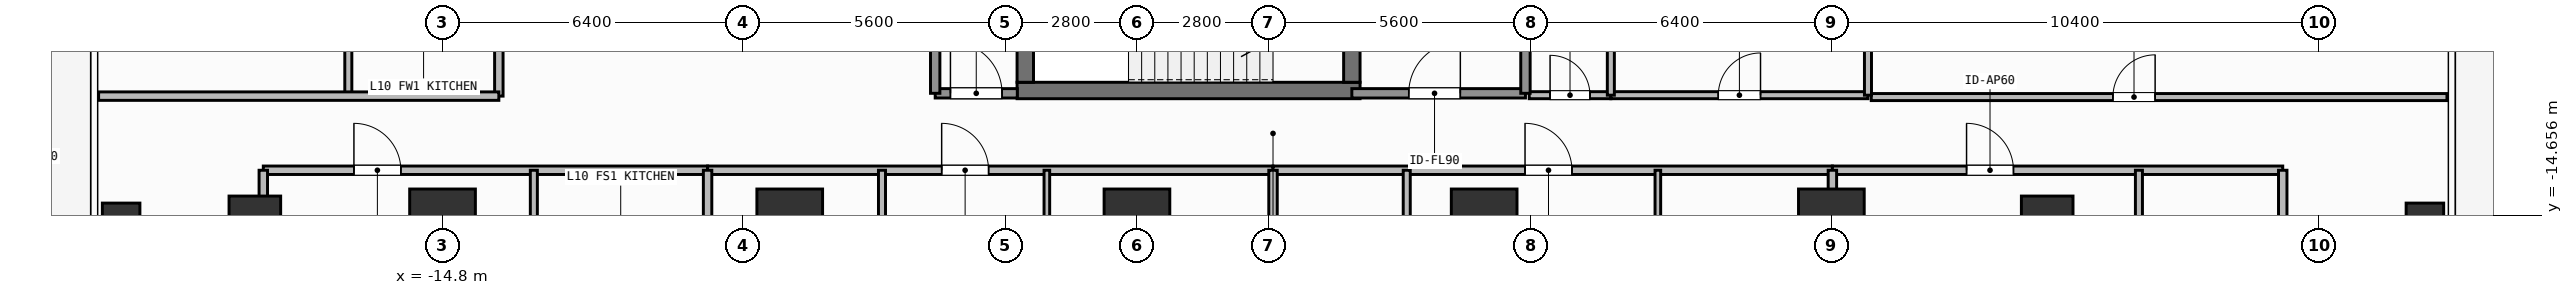
"""IFC4 building model, lengths in metres.
Left out: names, types, materials, properties, quantities, classifications, styles, units other than length and angle.
Written with IfcOpenShell. Run it as: python <this file> out.ifc"""

import sys

from ifc_helpers import new_model, si_unit, direction, frame, frame_2d, origin, origin_2d, place, context, subcontext, project, spatial, rectangle, hollow_rectangle, extrude, element, fill, save


model = new_model("IFC4")
c1 = context("Model", 3, precision=1e-05, world=origin(), true_north=direction((0.0, 1.0)))
c2 = subcontext(c1, "Body", "Model", "MODEL_VIEW")
j1 = project(units=[si_unit("LENGTHUNIT", "METRE"), si_unit("PLANEANGLEUNIT", "RADIAN")], contexts=[c1])
p1 = place(None, origin())
s1 = spatial("IfcSite", under=j1, at=p1, CompositionType="ELEMENT")
p2 = place(p1, origin())
s2 = spatial("IfcBuilding", under=s1, at=p2, CompositionType="ELEMENT")
p3 = place(p2, frame((0.0, 0.0, 38.4)))
s3 = spatial("IfcBuildingStorey", under=s2, at=p3, CompositionType="ELEMENT", Elevation=38.4)
p4 = place(p3, frame((-2.555, -12.0, 0.0), z_axis=(0.0, 0.0, 1.0), x_axis=(1.0, 0.0, 0.0)))
e1 = element("IfcWall", 1, at=p4, inside=s3, PredefinedType="SHEAR", context=c2, shape_type="SweptSolid", body=[
    extrude(rectangle(XDim=7.31, YDim=0.35, at=frame_2d((3.655, 0.0))), origin(), (0.0, 0.0, 1.0), 3.9),
])
p5 = place(p3, frame((-2.38, -11.825, 0.0), z_axis=(0.0, 0.0, 1.0), x_axis=(0.0, 1.0, 0.0)))
e2 = element("IfcWall", 2, at=p5, inside=s3, PredefinedType="SHEAR", context=c2, shape_type="SweptSolid", body=[
    extrude(rectangle(XDim=2.925, YDim=0.35, at=frame_2d((1.462, 0.0))), origin(), (0.0, 0.0, 1.0), 3.9),
])
p6 = place(p3, frame((4.58, -8.9, 0.0), z_axis=(0.0, 0.0, 1.0), x_axis=(0.0, -1.0, 0.0)))
e3 = element("IfcWall", 3, at=p6, inside=s3, PredefinedType="SHEAR", context=c2, shape_type="SweptSolid", body=[
    extrude(rectangle(XDim=2.925, YDim=0.35, at=frame_2d((1.462, 0.0))), origin(), (0.0, 0.0, 1.0), 3.9),
])
p7 = place(p6, frame((0.913, 0.0, 0.0)))
e4 = element("IfcOpeningElement", 4, at=p7, cuts=e3, PredefinedType="OPENING", context=c2, shape_type="SweptSolid", body=[
    extrude(rectangle(XDim=1.1, YDim=2.15, at=frame_2d((0.55, 1.075))), frame((0.0, 0.185, 0.0), z_axis=(0.0, -1.0, 0.0), x_axis=(1.0, 0.0, 0.0)), (0.0, 0.0, 1.0), 0.37),
])
for number, where, z_axis, x_axis in (
    (5, (-14.8, -14.8, 0.0), (0.0, 0.0, 1.0), (1.0, 0.0, 0.0)),
    (6, (-7.4, -14.8, 0.0), (0.0, 0.0, 1.0), (1.0, 0.0, 0.0)),
    (7, (0.0, -14.8, 0.0), (0.0, 0.0, 1.0), (1.0, 0.0, 0.0)),
    (8, (7.4, -14.8, 0.0), (0.0, 0.0, 1.0), (1.0, 0.0, 0.0)),
    (9, (14.8, -14.8, 0.0), (0.0, 0.0, 1.0), (1.0, 0.0, 0.0)),
):
    element("IfcColumn", number, at=place(p3, frame(where, z_axis=z_axis, x_axis=x_axis)), inside=s3, PredefinedType="COLUMN", context=c2, shape_type="SweptSolid", body=[
        extrude(rectangle(XDim=1.4, YDim=1.4, at=origin_2d()), origin(), (0.0, 0.0, 1.0), 3.9),
    ])
for number, where, z_axis, x_axis in (
    (10, (-18.8, -14.8, 0.0), (0.0, 0.0, 1.0), (1.0, 0.0, 0.0)),
    (11, (19.4, -14.8, 0.0), (0.0, 0.0, 1.0), (1.0, 0.0, 0.0)),
):
    element("IfcColumn", number, at=place(p3, frame(where, z_axis=z_axis, x_axis=x_axis)), inside=s3, PredefinedType="COLUMN", context=c2, shape_type="SweptSolid", body=[
        extrude(rectangle(XDim=1.1, YDim=1.1, at=origin_2d()), origin(), (0.0, 0.0, 1.0), 3.9),
    ])
for number, where, z_axis, x_axis in (
    (12, (-21.65, -14.8, 0.0), (0.0, 0.0, 1.0), (1.0, 0.0, 0.0)),
    (13, (27.45, -14.8, 0.0), (0.0, 0.0, 1.0), (1.0, 0.0, 0.0)),
):
    element("IfcColumn", number, at=place(p3, frame(where, z_axis=z_axis, x_axis=x_axis)), inside=s3, PredefinedType="COLUMN", context=c2, shape_type="SweptSolid", body=[
        extrude(hollow_rectangle(XDim=0.8, YDim=0.8, WallThickness=0.036, at=origin_2d()), origin(), (0.0, 0.0, 1.0), 3.9),
    ])
p8 = place(p3, frame((4.58, -12.06, 0.0), z_axis=(0.0, 0.0, 1.0), x_axis=(1.0, 0.0, 0.0)))
e14 = element("IfcWall", 14, at=p8, inside=s3, PredefinedType="SOLIDWALL", context=c2, shape_type="SweptSolid", body=[
    extrude(rectangle(XDim=3.7, YDim=0.2, at=frame_2d((1.85, 0.0))), origin(), (0.0, 0.0, 1.0), 3.68),
])
p9 = place(p8, frame((1.212, 0.0, 0.0)))
e15 = element("IfcOpeningElement", 15, at=p9, cuts=e14, PredefinedType="OPENING", context=c2, shape_type="SweptSolid", body=[
    extrude(rectangle(XDim=1.1, YDim=2.15, at=frame_2d((0.55, 1.075))), frame((0.0, 0.11, 0.0), z_axis=(0.0, -1.0, 0.0), x_axis=(1.0, 0.0, 0.0)), (0.0, 0.0, 1.0), 0.22),
])
p10 = place(p3, frame((-4.3, -12.06, 0.0), z_axis=(0.0, 0.0, 1.0), x_axis=(1.0, 0.0, 0.0)))
e16 = element("IfcWall", 16, at=p10, inside=s3, PredefinedType="SOLIDWALL", context=c2, shape_type="SweptSolid", body=[
    extrude(rectangle(XDim=1.75, YDim=0.2, at=frame_2d((0.875, 0.0))), origin(), (0.0, 0.0, 1.0), 3.68),
])
p11 = place(p10, frame((0.325, 0.0, 0.0)))
e17 = element("IfcOpeningElement", 17, at=p11, cuts=e16, PredefinedType="OPENING", context=c2, shape_type="SweptSolid", body=[
    extrude(rectangle(XDim=1.1, YDim=2.15, at=frame_2d((0.55, 1.075))), frame((0.0, 0.11, 0.0), z_axis=(0.0, -1.0, 0.0), x_axis=(1.0, 0.0, 0.0)), (0.0, 0.0, 1.0), 0.22),
])
p12 = place(p3, frame((8.36, -12.1, 0.0), z_axis=(0.0, 0.0, 1.0), x_axis=(1.0, 0.0, 0.0)))
e18 = element("IfcWall", 18, at=p12, inside=s3, PredefinedType="PARTITIONING", context=c2, shape_type="SweptSolid", body=[
    extrude(rectangle(XDim=1.74, YDim=0.15, at=frame_2d((0.87, 0.0))), origin(), (0.0, 0.0, 1.0), 3.68),
])
p13 = place(p12, frame((0.445, 0.0, 0.0)))
e19 = element("IfcOpeningElement", 19, at=p13, cuts=e18, PredefinedType="OPENING", context=c2, shape_type="SweptSolid", body=[
    extrude(rectangle(XDim=0.85, YDim=2.1, at=frame_2d((0.425, 1.05))), frame((0.0, 0.085, 0.0), z_axis=(0.0, -1.0, 0.0), x_axis=(1.0, 0.0, 0.0)), (0.0, 0.0, 1.0), 0.17),
])
p14 = place(p3, frame((10.1, -12.1, 0.0), z_axis=(0.0, 0.0, 1.0), x_axis=(1.0, 0.0, 0.0)))
e20 = element("IfcWall", 20, at=p14, inside=s3, PredefinedType="PARTITIONING", context=c2, shape_type="SweptSolid", body=[
    extrude(rectangle(XDim=5.48, YDim=0.15, at=frame_2d((2.74, 0.0))), origin(), (0.0, 0.0, 1.0), 3.68),
])
p15 = place(p14, frame((2.29, 0.0, 0.0)))
e21 = element("IfcOpeningElement", 21, at=p15, cuts=e20, PredefinedType="OPENING", context=c2, shape_type="SweptSolid", body=[
    extrude(rectangle(XDim=0.9, YDim=2.1, at=frame_2d((0.45, 1.05))), frame((0.0, 0.085, 0.0), z_axis=(0.0, -1.0, 0.0), x_axis=(1.0, 0.0, 0.0)), (0.0, 0.0, 1.0), 0.17),
])
p16 = place(p3, frame((-18.62, -13.7, 0.0), z_axis=(0.0, 0.0, 1.0), x_axis=(1.0, 0.0, 0.0)))
e22 = element("IfcWall", 22, at=p16, inside=s3, PredefinedType="PARTITIONING", context=c2, shape_type="SweptSolid", body=[
    extrude(rectangle(XDim=9.469, YDim=0.18, at=frame_2d((4.735, 0.0))), origin(), (0.0, 0.0, 1.0), 3.68),
])
p17 = place(p16, frame((1.931, 0.0, 0.0)))
e23 = element("IfcOpeningElement", 23, at=p17, cuts=e22, PredefinedType="OPENING", context=c2, shape_type="SweptSolid", body=[
    extrude(rectangle(XDim=1.0, YDim=2.2, at=frame_2d((0.5, 1.1))), frame((0.0, 0.1, 0.0), z_axis=(0.0, -1.0, 0.0), x_axis=(1.0, 0.0, 0.0)), (0.0, 0.0, 1.0), 0.2),
])
p18 = place(p3, frame((-12.854, -17.599, 0.0), z_axis=(0.0, 0.0, 1.0), x_axis=(0.0, 1.0, 0.0)))
e24 = element("IfcWall", 24, at=p18, inside=s3, PredefinedType="PARTITIONING", context=c2, shape_type="SweptSolid", body=[
    extrude(rectangle(XDim=3.899, YDim=0.15, at=frame_2d((1.95, 0.0))), origin(), (0.0, 0.0, 1.0), 3.68),
])
p19 = place(p18, frame((1.183, 0.0, 0.0)))
e25 = element("IfcOpeningElement", 25, at=p19, cuts=e24, PredefinedType="OPENING", context=c2, shape_type="SweptSolid", body=[
    extrude(rectangle(XDim=0.85, YDim=2.1, at=frame_2d((0.425, 1.05))), frame((0.0, 0.085, 0.0), z_axis=(0.0, -1.0, 0.0), x_axis=(1.0, 0.0, 0.0)), (0.0, 0.0, 1.0), 0.17),
])
p20 = place(p3, frame((-9.151, -13.7, 0.0), z_axis=(0.0, 0.0, 1.0), x_axis=(1.0, 0.0, 0.0)))
e26 = element("IfcWall", 26, at=p20, inside=s3, PredefinedType="PARTITIONING", context=c2, shape_type="SweptSolid", body=[
    extrude(rectangle(XDim=12.051, YDim=0.18, at=frame_2d((6.025, 0.0))), origin(), (0.0, 0.0, 1.0), 3.68),
])
p21 = place(p20, frame((4.989, 0.0, 0.0)))
e27 = element("IfcOpeningElement", 27, at=p21, cuts=e26, PredefinedType="OPENING", context=c2, shape_type="SweptSolid", body=[
    extrude(rectangle(XDim=1.0, YDim=2.2, at=frame_2d((0.5, 1.1))), frame((0.0, 0.1, 0.0), z_axis=(0.0, -1.0, 0.0), x_axis=(1.0, 0.0, 0.0)), (0.0, 0.0, 1.0), 0.2),
])
p22 = place(p3, frame((-5.434, -20.79, 0.0), z_axis=(0.0, 0.0, 1.0), x_axis=(0.0, 1.0, 0.0)))
e28 = element("IfcWall", 28, at=p22, inside=s3, PredefinedType="PARTITIONING", context=c2, shape_type="SweptSolid", body=[
    extrude(rectangle(XDim=7.09, YDim=0.15, at=frame_2d((3.545, 0.0))), origin(), (0.0, 0.0, 1.0), 3.68),
])
p23 = place(p22, frame((2.133, 0.0, 0.0)))
e29 = element("IfcOpeningElement", 29, at=p23, cuts=e28, PredefinedType="OPENING", context=c2, shape_type="SweptSolid", body=[
    extrude(rectangle(XDim=0.85, YDim=2.1, at=frame_2d((0.425, 1.05))), frame((0.0, 0.085, 0.0), z_axis=(0.0, -1.0, 0.0), x_axis=(1.0, 0.0, 0.0)), (0.0, 0.0, 1.0), 0.17),
])
p24 = place(p3, frame((-1.92, -18.663, 0.0), z_axis=(0.0, 0.0, 1.0), x_axis=(0.0, 1.0, 0.0)))
e30 = element("IfcWall", 30, at=p24, inside=s3, PredefinedType="PARTITIONING", context=c2, shape_type="SweptSolid", body=[
    extrude(rectangle(XDim=4.963, YDim=0.12, at=frame_2d((2.481, 0.0))), origin(), (0.0, 0.0, 1.0), 3.68),
])
p25 = place(p24, frame((2.056, 0.0, 0.0)))
e31 = element("IfcOpeningElement", 31, at=p25, cuts=e30, PredefinedType="OPENING", context=c2, shape_type="SweptSolid", body=[
    extrude(rectangle(XDim=0.85, YDim=2.1, at=frame_2d((0.425, 1.05))), frame((0.0, 0.07, 0.0), z_axis=(0.0, -1.0, 0.0), x_axis=(1.0, 0.0, 0.0)), (0.0, 0.0, 1.0), 0.14),
])
p26 = place(p3, frame((2.9, -13.7, 0.0), z_axis=(0.0, 0.0, 1.0), x_axis=(1.0, 0.0, 0.0)))
e32 = element("IfcWall", 32, at=p26, inside=s3, PredefinedType="PARTITIONING", context=c2, shape_type="SweptSolid", body=[
    extrude(rectangle(XDim=11.922, YDim=0.18, at=frame_2d((5.961, 0.0))), origin(), (0.0, 0.0, 1.0), 3.68),
])
p27 = place(p26, frame((5.371, 0.0, 0.0)))
e33 = element("IfcOpeningElement", 33, at=p27, cuts=e32, PredefinedType="OPENING", context=c2, shape_type="SweptSolid", body=[
    extrude(rectangle(XDim=1.0, YDim=2.2, at=frame_2d((0.5, 1.1))), frame((0.0, 0.1, 0.0), z_axis=(0.0, -1.0, 0.0), x_axis=(1.0, 0.0, 0.0)), (0.0, 0.0, 1.0), 0.2),
])
p28 = place(p3, frame((5.75, -20.79, 0.0), z_axis=(0.0, 0.0, 1.0), x_axis=(0.0, 1.0, 0.0)))
e34 = element("IfcWall", 34, at=p28, inside=s3, PredefinedType="PARTITIONING", context=c2, shape_type="SweptSolid", body=[
    extrude(rectangle(XDim=7.09, YDim=0.15, at=frame_2d((3.545, 0.0))), origin(), (0.0, 0.0, 1.0), 3.68),
])
p29 = place(p28, frame((2.133, 0.0, 0.0)))
e35 = element("IfcOpeningElement", 35, at=p29, cuts=e34, PredefinedType="OPENING", context=c2, shape_type="SweptSolid", body=[
    extrude(rectangle(XDim=0.85, YDim=2.1, at=frame_2d((0.425, 1.05))), frame((0.0, 0.085, 0.0), z_axis=(0.0, -1.0, 0.0), x_axis=(1.0, 0.0, 0.0)), (0.0, 0.0, 1.0), 0.17),
])
p30 = place(p3, frame((11.102, -18.535, 0.0), z_axis=(0.0, 0.0, 1.0), x_axis=(0.0, 1.0, 0.0)))
e36 = element("IfcWall", 36, at=p30, inside=s3, PredefinedType="PARTITIONING", context=c2, shape_type="SweptSolid", body=[
    extrude(rectangle(XDim=4.835, YDim=0.12, at=frame_2d((2.417, 0.0))), origin(), (0.0, 0.0, 1.0), 3.37),
])
p31 = place(p30, frame((1.905, 0.0, 0.0)))
e37 = element("IfcOpeningElement", 37, at=p31, cuts=e36, PredefinedType="OPENING", context=c2, shape_type="SweptSolid", body=[
    extrude(rectangle(XDim=0.85, YDim=2.1, at=frame_2d((0.425, 1.05))), frame((0.0, 0.07, 0.0), z_axis=(0.0, -1.0, 0.0), x_axis=(1.0, 0.0, 0.0)), (0.0, 0.0, 1.0), 0.14),
])
p32 = place(p3, frame((14.822, -13.7, 0.0), z_axis=(0.0, 0.0, 1.0), x_axis=(1.0, 0.0, 0.0)))
e38 = element("IfcWall", 38, at=p32, inside=s3, PredefinedType="PARTITIONING", context=c2, shape_type="SweptSolid", body=[
    extrude(rectangle(XDim=9.598, YDim=0.18, at=frame_2d((4.799, 0.0))), origin(), (0.0, 0.0, 1.0), 3.68),
])
p33 = place(p32, frame((2.859, 0.0, 0.0)))
e39 = element("IfcOpeningElement", 39, at=p33, cuts=e38, PredefinedType="OPENING", context=c2, shape_type="SweptSolid", body=[
    extrude(rectangle(XDim=1.0, YDim=2.2, at=frame_2d((0.5, 1.1))), frame((0.0, 0.1, 0.0), z_axis=(0.0, -1.0, 0.0), x_axis=(1.0, 0.0, 0.0)), (0.0, 0.0, 1.0), 0.2),
])
p34 = place(p3, frame((21.355, -17.599, 0.0), z_axis=(0.0, 0.0, 1.0), x_axis=(0.0, 1.0, 0.0)))
e40 = element("IfcWall", 40, at=p34, inside=s3, PredefinedType="PARTITIONING", context=c2, shape_type="SweptSolid", body=[
    extrude(rectangle(XDim=3.899, YDim=0.15, at=frame_2d((1.95, 0.0))), origin(), (0.0, 0.0, 1.0), 3.68),
])
p35 = place(p34, frame((1.354, 0.0, 0.0)))
e41 = element("IfcOpeningElement", 41, at=p35, cuts=e40, PredefinedType="OPENING", context=c2, shape_type="SweptSolid", body=[
    extrude(rectangle(XDim=0.85, YDim=2.1, at=frame_2d((0.425, 1.05))), frame((0.0, 0.085, 0.0), z_axis=(0.0, -1.0, 0.0), x_axis=(1.0, 0.0, 0.0)), (0.0, 0.0, 1.0), 0.17),
])
p36 = place(p3, frame((-13.6, -12.12, 0.0), z_axis=(0.0, 0.0, 1.0), x_axis=(0.0, 1.0, 0.0)))
e42 = element("IfcWall", 42, at=p36, inside=s3, PredefinedType="PARTITIONING", context=c2, shape_type="SweptSolid", body=[
    extrude(rectangle(XDim=12.847, YDim=0.18, at=frame_2d((6.424, 0.0))), origin(), (0.0, 0.0, 1.0), 3.68),
])
p37 = place(p36, frame((5.48, 0.0, 0.0)))
e43 = element("IfcOpeningElement", 43, at=p37, cuts=e42, PredefinedType="OPENING", context=c2, shape_type="SweptSolid", body=[
    extrude(rectangle(XDim=1.0, YDim=2.2, at=frame_2d((0.5, 1.1))), frame((0.0, 0.1, 0.0), z_axis=(0.0, -1.0, 0.0), x_axis=(1.0, 0.0, 0.0)), (0.0, 0.0, 1.0), 0.2),
])
p38 = place(p3, frame((15.65, -12.14, 0.0), z_axis=(0.0, 0.0, 1.0), x_axis=(1.0, 0.0, 0.0)))
e44 = element("IfcWall", 44, at=p38, inside=s3, PredefinedType="PARTITIONING", context=c2, shape_type="SweptSolid", body=[
    extrude(rectangle(XDim=12.27, YDim=0.15, at=frame_2d((6.135, 0.0))), origin(), (0.0, 0.0, 1.0), 3.68),
])
p39 = place(p38, frame((5.15, 0.0, 0.0)))
e45 = element("IfcOpeningElement", 45, at=p39, cuts=e44, PredefinedType="OPENING", context=c2, shape_type="SweptSolid", body=[
    extrude(rectangle(XDim=0.9, YDim=2.1, at=frame_2d((0.45, 1.05))), frame((0.0, 0.085, 0.0), z_axis=(0.0, -1.0, 0.0), x_axis=(1.0, 0.0, 0.0)), (0.0, 0.0, 1.0), 0.17),
])
for number, where, z_axis, x_axis in (
    (46, (8.28, -12.06, 0.0), (0.0, 0.0, 1.0), (0.0, 1.0, 0.0)),
    (47, (-4.3, -12.06, 0.0), (0.0, 0.0, 1.0), (0.0, 1.0, 0.0)),
):
    element("IfcWall", number, at=place(p3, frame(where, z_axis=z_axis, x_axis=x_axis)), inside=s3, PredefinedType="SOLIDWALL", context=c2, shape_type="SweptSolid", body=[
        extrude(rectangle(XDim=3.11, YDim=0.2, at=frame_2d((1.555, 0.0))), origin(), (0.0, 0.0, 1.0), 3.68),
    ])
p40 = place(p3, frame((10.1, -12.1, 0.0), z_axis=(0.0, 0.0, 1.0), x_axis=(0.0, 1.0, 0.0)))
e48 = element("IfcWall", 48, at=p40, inside=s3, PredefinedType="PARTITIONING", context=c2, shape_type="SweptSolid", body=[
    extrude(rectangle(XDim=2.35, YDim=0.15, at=frame_2d((1.175, 0.0))), origin(), (0.0, 0.0, 1.0), 3.68),
])
p41 = place(p3, frame((15.58, -12.1, 0.0), z_axis=(0.0, 0.0, 1.0), x_axis=(0.0, 1.0, 0.0)))
e49 = element("IfcWall", 49, at=p41, inside=s3, PredefinedType="PARTITIONING", context=c2, shape_type="SweptSolid", body=[
    extrude(rectangle(XDim=6.25, YDim=0.15, at=frame_2d((3.125, 0.0))), origin(), (0.0, 0.0, 1.0), 3.68),
])
p42 = place(p3, frame((-18.62, -23.91, 0.0), z_axis=(0.0, 0.0, 1.0), x_axis=(0.0, 1.0, 0.0)))
e50 = element("IfcWall", 50, at=p42, inside=s3, PredefinedType="PARTITIONING", context=c2, shape_type="SweptSolid", body=[
    extrude(rectangle(XDim=10.21, YDim=0.18, at=frame_2d((5.105, 0.0))), origin(), (0.0, 0.0, 1.0), 3.082),
])
p43 = place(p3, frame((24.42, -23.91, 0.0), z_axis=(0.0, 0.0, 1.0), x_axis=(0.0, 1.0, 0.0)))
e51 = element("IfcWall", 51, at=p43, inside=s3, PredefinedType="PARTITIONING", context=c2, shape_type="SweptSolid", body=[
    extrude(rectangle(XDim=10.21, YDim=0.18, at=frame_2d((5.105, 0.0))), origin(), (0.0, 0.0, 1.0), 3.68),
])
for number, where, z_axis, x_axis in (
    (52, (-9.151, -25.03, 0.0), (0.0, 0.0, 1.0), (0.0, 1.0, 0.0)),
    (53, (2.9, -25.03, 0.0), (0.0, 0.0, 1.0), (0.0, 1.0, 0.0)),
):
    element("IfcWall", number, at=place(p3, frame(where, z_axis=z_axis, x_axis=x_axis)), inside=s3, PredefinedType="PARTITIONING", context=c2, shape_type="SweptSolid", body=[
        extrude(rectangle(XDim=11.33, YDim=0.18, at=frame_2d((5.665, 0.0))), origin(), (0.0, 0.0, 1.0), 3.68),
    ])
p44 = place(p3, frame((14.822, -25.03, 0.0), z_axis=(0.0, 0.0, 1.0), x_axis=(0.0, 1.0, 0.0)))
e54 = element("IfcWall", 54, at=p44, inside=s3, PredefinedType="PARTITIONING", context=c2, shape_type="SweptSolid", body=[
    extrude(rectangle(XDim=11.33, YDim=0.18, at=frame_2d((5.665, 0.0))), origin(), (0.0, 0.0, 1.0), 3.082),
])
p45 = place(p3, frame((-16.808, -12.12, 0.0), z_axis=(0.0, 0.0, 1.0), x_axis=(0.0, 1.0, 0.0)))
e55 = element("IfcWall", 55, at=p45, inside=s3, PredefinedType="PARTITIONING", context=c2, shape_type="SweptSolid", body=[
    extrude(rectangle(XDim=2.8, YDim=0.15, at=frame_2d((1.4, 0.0))), origin(), (0.0, 0.0, 1.0), 3.68),
])
p46 = place(p3, frame((-22.13, -12.12, 0.0), z_axis=(0.0, 0.0, 1.0), x_axis=(1.0, 0.0, 0.0)))
e56 = element("IfcWall", 56, at=p46, inside=s3, PredefinedType="PARTITIONING", context=c2, shape_type="SweptSolid", body=[
    extrude(rectangle(XDim=8.53, YDim=0.18, at=frame_2d((4.265, 0.0))), origin(), (0.0, 0.0, 1.0), 3.68),
])
p47 = place(p9, origin())
e57 = element("IfcDoor", 57, at=p47, inside=s3, OperationType="SINGLE_SWING_RIGHT", PredefinedType="DOOR", context=c2, shape_type="SweptSolid", body=[
    extrude(rectangle(XDim=1.1, YDim=2.15, at=frame_2d((0.55, 1.075))), frame((0.0, 0.025, 0.0), z_axis=(0.0, -1.0, 0.0), x_axis=(1.0, 0.0, 0.0)), (0.0, 0.0, 1.0), 0.05),
])
fill(e15, e57)
p48 = place(p11, origin())
e58 = element("IfcDoor", 58, at=p48, inside=s3, OperationType="SINGLE_SWING_LEFT", PredefinedType="DOOR", context=c2, shape_type="SweptSolid", body=[
    extrude(rectangle(XDim=1.1, YDim=2.15, at=frame_2d((0.55, 1.075))), frame((0.0, 0.025, 0.0), z_axis=(0.0, -1.0, 0.0), x_axis=(1.0, 0.0, 0.0)), (0.0, 0.0, 1.0), 0.05),
])
fill(e17, e58)
p49 = place(p13, origin())
e59 = element("IfcDoor", 59, at=p49, inside=s3, OperationType="SINGLE_SWING_LEFT", PredefinedType="DOOR", context=c2, shape_type="SweptSolid", body=[
    extrude(rectangle(XDim=0.85, YDim=2.1, at=frame_2d((0.425, 1.05))), frame((0.0, 0.025, 0.0), z_axis=(0.0, -1.0, 0.0), x_axis=(1.0, 0.0, 0.0)), (0.0, 0.0, 1.0), 0.05),
])
fill(e19, e59)
p50 = place(p15, origin())
e60 = element("IfcDoor", 60, at=p50, inside=s3, OperationType="SINGLE_SWING_RIGHT", PredefinedType="DOOR", context=c2, shape_type="SweptSolid", body=[
    extrude(rectangle(XDim=0.9, YDim=2.1, at=frame_2d((0.45, 1.05))), frame((0.0, 0.025, 0.0), z_axis=(0.0, -1.0, 0.0), x_axis=(1.0, 0.0, 0.0)), (0.0, 0.0, 1.0), 0.05),
])
fill(e21, e60)
p51 = place(p17, origin())
e61 = element("IfcDoor", 61, at=p51, inside=s3, OperationType="SINGLE_SWING_LEFT", PredefinedType="DOOR", context=c2, shape_type="SweptSolid", body=[
    extrude(rectangle(XDim=1.0, YDim=2.2, at=frame_2d((0.5, 1.1))), frame((0.0, 0.025, 0.0), z_axis=(0.0, -1.0, 0.0), x_axis=(1.0, 0.0, 0.0)), (0.0, 0.0, 1.0), 0.05),
])
fill(e23, e61)
p52 = place(p21, origin())
e62 = element("IfcDoor", 62, at=p52, inside=s3, OperationType="SINGLE_SWING_LEFT", PredefinedType="DOOR", context=c2, shape_type="SweptSolid", body=[
    extrude(rectangle(XDim=1.0, YDim=2.2, at=frame_2d((0.5, 1.1))), frame((0.0, 0.025, 0.0), z_axis=(0.0, -1.0, 0.0), x_axis=(1.0, 0.0, 0.0)), (0.0, 0.0, 1.0), 0.05),
])
fill(e27, e62)
p53 = place(p27, origin())
e63 = element("IfcDoor", 63, at=p53, inside=s3, OperationType="SINGLE_SWING_LEFT", PredefinedType="DOOR", context=c2, shape_type="SweptSolid", body=[
    extrude(rectangle(XDim=1.0, YDim=2.2, at=frame_2d((0.5, 1.1))), frame((0.0, 0.025, 0.0), z_axis=(0.0, -1.0, 0.0), x_axis=(1.0, 0.0, 0.0)), (0.0, 0.0, 1.0), 0.05),
])
fill(e33, e63)
p54 = place(p33, origin())
e64 = element("IfcDoor", 64, at=p54, inside=s3, OperationType="SINGLE_SWING_LEFT", PredefinedType="DOOR", context=c2, shape_type="SweptSolid", body=[
    extrude(rectangle(XDim=1.0, YDim=2.2, at=frame_2d((0.5, 1.1))), frame((0.0, 0.025, 0.0), z_axis=(0.0, -1.0, 0.0), x_axis=(1.0, 0.0, 0.0)), (0.0, 0.0, 1.0), 0.05),
])
fill(e39, e64)
p55 = place(p39, origin())
e65 = element("IfcDoor", 65, at=p55, inside=s3, OperationType="SINGLE_SWING_RIGHT", PredefinedType="DOOR", context=c2, shape_type="SweptSolid", body=[
    extrude(rectangle(XDim=0.9, YDim=2.1, at=frame_2d((0.45, 1.05))), frame((0.0, 0.025, 0.0), z_axis=(0.0, -1.0, 0.0), x_axis=(1.0, 0.0, 0.0)), (0.0, 0.0, 1.0), 0.05),
])
fill(e45, e65)
save(model, sys.argv[1])
